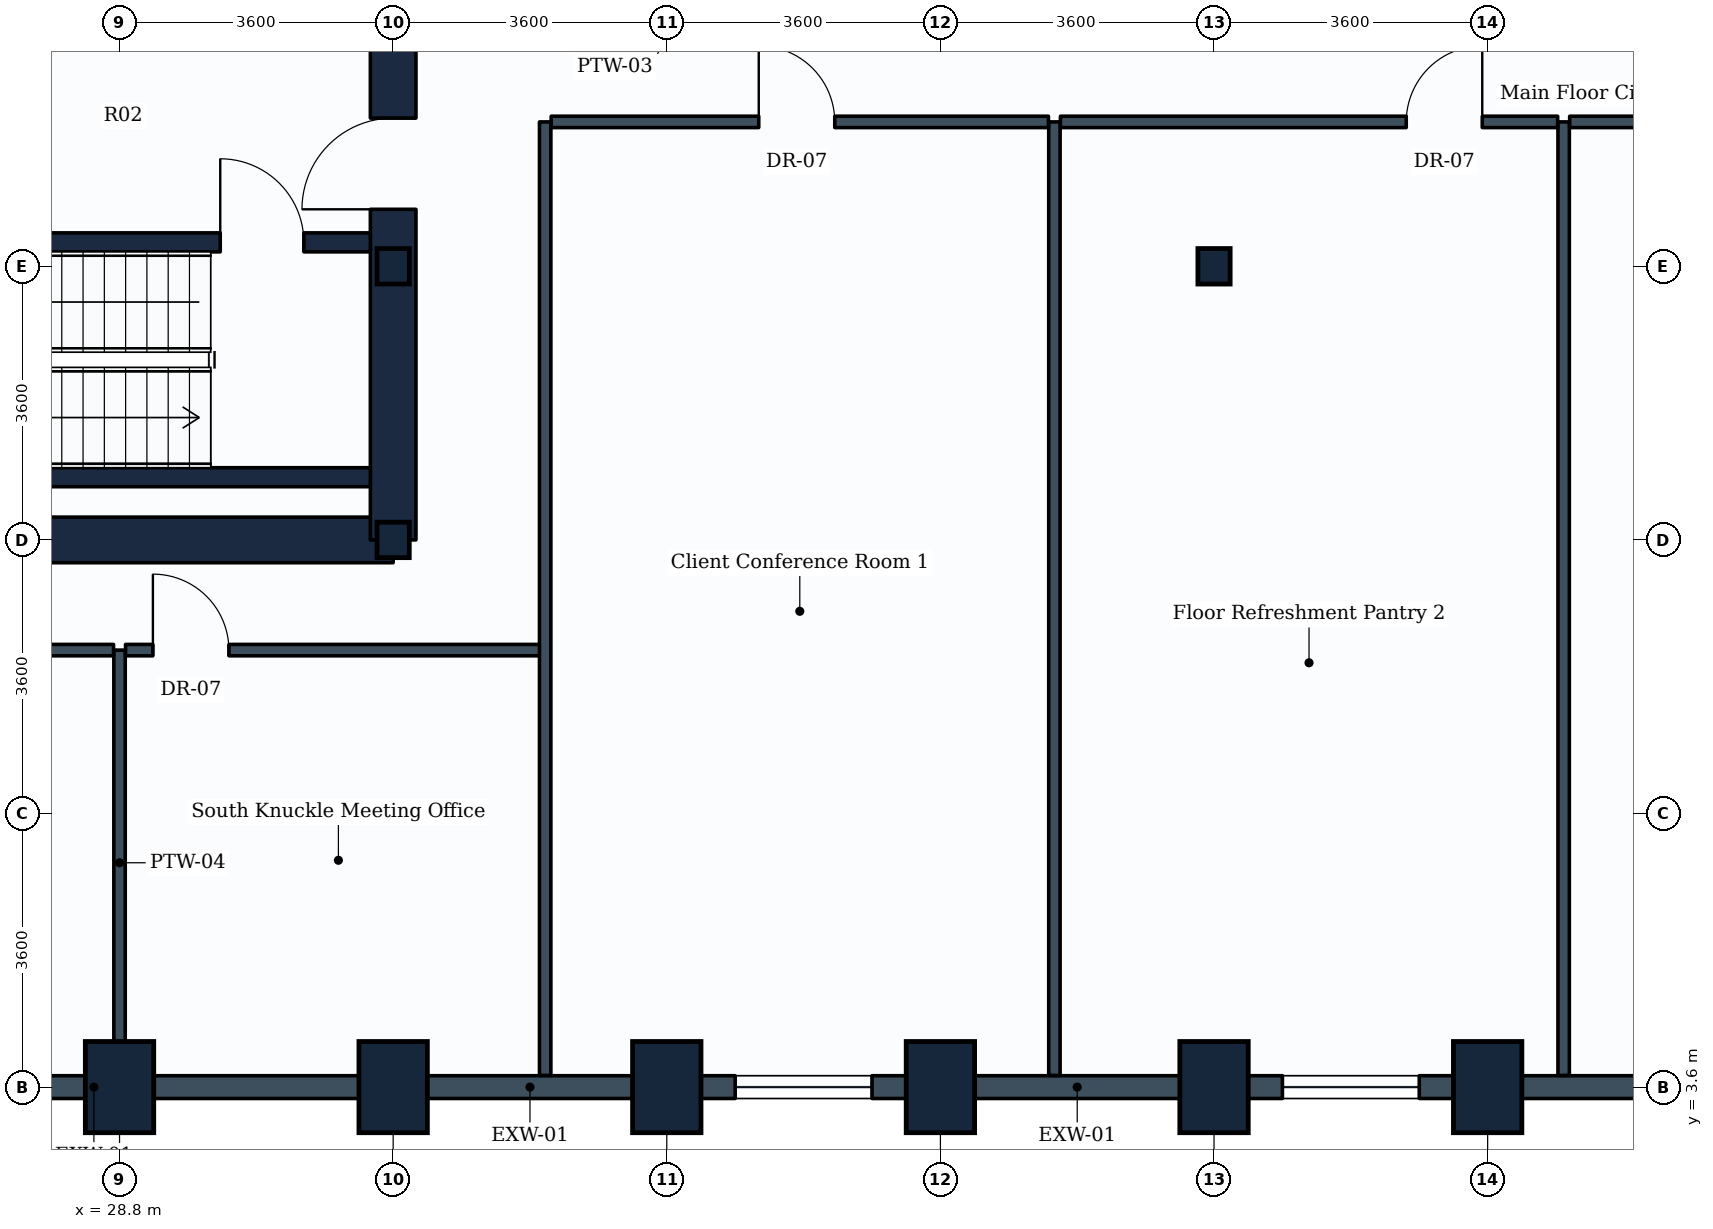
"""IFC4 building model, lengths in metres.
Left out: names, types, materials, properties, quantities, classifications, styles, units other than length and angle.
Written with IfcOpenShell. Run it as: python <this file> out.ifc"""

import sys

from ifc_helpers import new_model, si_unit, direction, frame, frame_2d, origin, origin_2d, place, context, subcontext, project, spatial, rectangle, i_section, extrude, element, fill, save


model = new_model("IFC4")
c1 = context("Model", 3, precision=1e-05, world=origin(), true_north=direction((0.0, 1.0)))
c2 = subcontext(c1, "Body", "Model", "MODEL_VIEW")
j1 = project(units=[si_unit("LENGTHUNIT", "METRE"), si_unit("PLANEANGLEUNIT", "RADIAN")], contexts=[c1])
p1 = place(None, origin())
s1 = spatial("IfcSite", under=j1, at=p1, CompositionType="ELEMENT")
p2 = place(p1, origin())
s2 = spatial("IfcBuilding", under=s1, at=p2, CompositionType="ELEMENT")
p3 = place(p2, frame((0.0, 0.0, 39.6)))
s3 = spatial("IfcBuildingStorey", under=s2, at=p3, CompositionType="ELEMENT", Elevation=39.6)
for number, where, z_axis, x_axis in (
    (1, (28.8, 3.6, 0.0), (0.0, 0.0, 1.0), (1.0, 0.0, 0.0)),
    (2, (32.4, 3.6, 0.0), (0.0, 0.0, 1.0), (1.0, 0.0, 0.0)),
):
    element("IfcColumn", number, at=place(p3, frame(where, z_axis=z_axis, x_axis=x_axis)), inside=s3, PredefinedType="COLUMN", context=c2, shape_type="SweptSolid", body=[
        extrude(rectangle(XDim=0.9, YDim=1.2, at=origin_2d()), origin(), (0.0, 0.0, 1.0), 3.9),
    ])
for number, where, z_axis, x_axis in (
    (3, (32.4, 10.8, 0.0), (0.0, 0.0, 1.0), (1.0, 0.0, 0.0)),
    (4, (32.4, 14.4, 0.0), (0.0, 0.0, 1.0), (1.0, 0.0, 0.0)),
):
    element("IfcColumn", number, at=place(p3, frame(where, z_axis=z_axis, x_axis=x_axis)), inside=s3, PredefinedType="COLUMN", context=c2, shape_type="SweptSolid", body=[
        extrude(i_section(OverallWidth=0.424, OverallDepth=0.467, WebThickness=0.033, FlangeThickness=0.053, FilletRadius=0.015, at=origin_2d()), origin(), (0.0, 0.0, 1.0), 3.9),
    ])
for number, where, z_axis, x_axis in (
    (5, (36.0, 3.6, 0.0), (0.0, 0.0, 1.0), (1.0, 0.0, 0.0)),
    (6, (39.6, 3.6, 0.0), (0.0, 0.0, 1.0), (1.0, 0.0, 0.0)),
    (7, (43.2, 3.6, 0.0), (0.0, 0.0, 1.0), (1.0, 0.0, 0.0)),
):
    element("IfcColumn", number, at=place(p3, frame(where, z_axis=z_axis, x_axis=x_axis)), inside=s3, PredefinedType="COLUMN", context=c2, shape_type="SweptSolid", body=[
        extrude(rectangle(XDim=0.9, YDim=1.2, at=origin_2d()), origin(), (0.0, 0.0, 1.0), 3.9),
    ])
p4 = place(p3, frame((43.2, 14.4, 0.0), z_axis=(0.0, 0.0, 1.0), x_axis=(1.0, 0.0, 0.0)))
e8 = element("IfcColumn", 8, at=p4, inside=s3, PredefinedType="COLUMN", context=c2, shape_type="SweptSolid", body=[
    extrude(i_section(OverallWidth=0.424, OverallDepth=0.467, WebThickness=0.033, FlangeThickness=0.053, FilletRadius=0.015, at=origin_2d()), origin(), (0.0, 0.0, 1.0), 3.9),
])
p5 = place(p3, frame((46.8, 3.6, 0.0), z_axis=(0.0, 0.0, 1.0), x_axis=(1.0, 0.0, 0.0)))
e9 = element("IfcColumn", 9, at=p5, inside=s3, PredefinedType="COLUMN", context=c2, shape_type="SweptSolid", body=[
    extrude(rectangle(XDim=0.9, YDim=1.2, at=origin_2d()), origin(), (0.0, 0.0, 1.0), 3.9),
])
p6 = place(p3, frame((28.8, 3.6, 0.0), z_axis=(0.0, 0.0, 1.0), x_axis=(-1.0, 0.0, 0.0)))
e10 = element("IfcWall", 10, at=p6, inside=s3, PredefinedType="STANDARD", context=c2, shape_type="SweptSolid", body=[
    extrude(rectangle(XDim=3.6, YDim=0.3, at=frame_2d((1.8, 0.0))), origin(), (0.0, 0.0, 1.0), 2.93),
])
p7 = place(p6, frame((0.925, 0.0, 0.85)))
e11 = element("IfcOpeningElement", 11, at=p7, cuts=e10, PredefinedType="OPENING", context=c2, shape_type="SweptSolid", body=[
    extrude(rectangle(XDim=1.8, YDim=1.35, at=frame_2d((0.9, 0.675))), frame((0.0, 0.16, 0.0), z_axis=(0.0, -1.0, 0.0), x_axis=(1.0, 0.0, 0.0)), (0.0, 0.0, 1.0), 0.32),
])
p8 = place(p3, frame((32.4, 3.6, 0.0), z_axis=(0.0, 0.0, 1.0), x_axis=(-1.0, 0.0, 0.0)))
e12 = element("IfcWall", 12, at=p8, inside=s3, PredefinedType="STANDARD", context=c2, shape_type="SweptSolid", body=[
    extrude(rectangle(XDim=3.6, YDim=0.3, at=frame_2d((1.8, 0.0))), origin(), (0.0, 0.0, 1.0), 2.93),
])
p9 = place(p3, frame((36.0, 3.6, 0.0), z_axis=(0.0, 0.0, 1.0), x_axis=(-1.0, 0.0, 0.0)))
e13 = element("IfcWall", 13, at=p9, inside=s3, PredefinedType="STANDARD", context=c2, shape_type="SweptSolid", body=[
    extrude(rectangle(XDim=3.6, YDim=0.3, at=frame_2d((1.8, 0.0))), origin(), (0.0, 0.0, 1.0), 2.93),
])
p10 = place(p3, frame((39.6, 3.6, 0.0), z_axis=(0.0, 0.0, 1.0), x_axis=(-1.0, 0.0, 0.0)))
e14 = element("IfcWall", 14, at=p10, inside=s3, PredefinedType="STANDARD", context=c2, shape_type="SweptSolid", body=[
    extrude(rectangle(XDim=3.6, YDim=0.3, at=frame_2d((1.8, 0.0))), origin(), (0.0, 0.0, 1.0), 2.93),
])
p11 = place(p10, frame((0.9, 0.0, 0.85)))
e15 = element("IfcOpeningElement", 15, at=p11, cuts=e14, PredefinedType="OPENING", context=c2, shape_type="SweptSolid", body=[
    extrude(rectangle(XDim=1.8, YDim=1.35, at=frame_2d((0.9, 0.675))), frame((0.0, 0.16, 0.0), z_axis=(0.0, -1.0, 0.0), x_axis=(1.0, 0.0, 0.0)), (0.0, 0.0, 1.0), 0.32),
])
p12 = place(p3, frame((43.2, 3.6, 0.0), z_axis=(0.0, 0.0, 1.0), x_axis=(-1.0, 0.0, 0.0)))
e16 = element("IfcWall", 16, at=p12, inside=s3, PredefinedType="STANDARD", context=c2, shape_type="SweptSolid", body=[
    extrude(rectangle(XDim=3.6, YDim=0.3, at=frame_2d((1.8, 0.0))), origin(), (0.0, 0.0, 1.0), 2.93),
])
p13 = place(p3, frame((46.8, 3.6, 0.0), z_axis=(0.0, 0.0, 1.0), x_axis=(-1.0, 0.0, 0.0)))
e17 = element("IfcWall", 17, at=p13, inside=s3, PredefinedType="STANDARD", context=c2, shape_type="SweptSolid", body=[
    extrude(rectangle(XDim=3.6, YDim=0.3, at=frame_2d((1.8, 0.0))), origin(), (0.0, 0.0, 1.0), 2.93),
])
p14 = place(p13, frame((0.9, 0.0, 0.85)))
e18 = element("IfcOpeningElement", 18, at=p14, cuts=e17, PredefinedType="OPENING", context=c2, shape_type="SweptSolid", body=[
    extrude(rectangle(XDim=1.8, YDim=1.35, at=frame_2d((0.9, 0.675))), frame((0.0, 0.16, 0.0), z_axis=(0.0, -1.0, 0.0), x_axis=(1.0, 0.0, 0.0)), (0.0, 0.0, 1.0), 0.32),
])
p15 = place(p3, frame((50.4, 3.6, 0.0), z_axis=(0.0, 0.0, 1.0), x_axis=(-1.0, 0.0, 0.0)))
e19 = element("IfcWall", 19, at=p15, inside=s3, PredefinedType="STANDARD", context=c2, shape_type="SweptSolid", body=[
    extrude(rectangle(XDim=3.6, YDim=0.3, at=frame_2d((1.8, 0.0))), origin(), (0.0, 0.0, 1.0), 2.93),
])
p16 = place(p3, frame((14.4, 10.8, 0.0), z_axis=(0.0, 0.0, 1.0), x_axis=(1.0, 0.0, 0.0)))
e20 = element("IfcWall", 20, at=p16, inside=s3, PredefinedType="SHEAR", context=c2, shape_type="SweptSolid", body=[
    extrude(rectangle(XDim=18.0, YDim=0.6, at=frame_2d((9.0, 0.0))), origin(), (0.0, 0.0, 1.0), 3.65),
])
p17 = place(p3, frame((32.4, 10.8, 0.0), z_axis=(0.0, 0.0, 1.0), x_axis=(0.0, 1.0, 0.0)))
e21 = element("IfcWall", 21, at=p17, inside=s3, PredefinedType="SHEAR", context=c2, shape_type="SweptSolid", body=[
    extrude(rectangle(XDim=14.4, YDim=0.6, at=frame_2d((7.2, 0.0))), origin(), (0.0, 0.0, 1.0), 3.65),
])
p18 = place(p17, frame((4.35, 0.0, 0.0)))
e22 = element("IfcOpeningElement", 22, at=p18, cuts=e21, PredefinedType="OPENING", context=c2, shape_type="SweptSolid", body=[
    extrude(rectangle(XDim=1.2, YDim=2.1, at=frame_2d((0.6, 1.05))), frame((0.0, 0.31, 0.0), z_axis=(0.0, -1.0, 0.0), x_axis=(1.0, 0.0, 0.0)), (0.0, 0.0, 1.0), 0.62),
])
p19 = place(p17, frame((10.0, 0.0, 0.0)))
e23 = element("IfcOpeningElement", 23, at=p19, cuts=e21, PredefinedType="OPENING", context=c2, shape_type="SweptSolid", body=[
    extrude(rectangle(XDim=1.2, YDim=2.1, at=frame_2d((0.6, 1.05))), frame((0.0, 0.31, 0.0), z_axis=(0.0, -1.0, 0.0), x_axis=(1.0, 0.0, 0.0)), (0.0, 0.0, 1.0), 0.62),
])
p20 = place(p3, frame((23.35, 11.625, 0.0), z_axis=(0.0, 0.0, 1.0), x_axis=(1.0, 0.0, 0.0)))
e24 = element("IfcWall", 24, at=p20, inside=s3, PredefinedType="SHEAR", context=c2, shape_type="SweptSolid", body=[
    extrude(rectangle(XDim=8.75, YDim=0.25, at=frame_2d((4.375, 0.0))), origin(), (0.0, 0.0, 1.0), 3.65),
])
p21 = place(p3, frame((23.35, 14.715, 0.0), z_axis=(0.0, 0.0, 1.0), x_axis=(1.0, 0.0, 0.0)))
e25 = element("IfcWall", 25, at=p21, inside=s3, PredefinedType="SHEAR", context=c2, shape_type="SweptSolid", body=[
    extrude(rectangle(XDim=8.75, YDim=0.25, at=frame_2d((4.375, 0.0))), origin(), (0.0, 0.0, 1.0), 3.65),
])
p22 = place(p21, frame((6.775, 0.0, 0.0)))
e26 = element("IfcOpeningElement", 26, at=p22, cuts=e25, PredefinedType="OPENING", context=c2, shape_type="SweptSolid", body=[
    extrude(rectangle(XDim=1.1, YDim=2.1, at=frame_2d((0.55, 1.05))), frame((0.0, 0.135, 0.0), z_axis=(0.0, -1.0, 0.0), x_axis=(1.0, 0.0, 0.0)), (0.0, 0.0, 1.0), 0.27),
])
p23 = place(p3, frame((28.8, 9.35, 0.0), z_axis=(0.0, 0.0, 1.0), x_axis=(0.0, -1.0, 0.0)))
e27 = element("IfcWall", 27, at=p23, inside=s3, PredefinedType="PARTITIONING", context=c2, shape_type="SweptSolid", body=[
    extrude(rectangle(XDim=5.596, YDim=0.15, at=frame_2d((2.798, 0.0))), origin(), (0.0, 0.0, 1.0), 3.635),
])
p24 = place(p3, frame((20.479, 9.35, 0.0), z_axis=(0.0, 0.0, 1.0), x_axis=(1.0, 0.0, 0.0)))
e28 = element("IfcWall", 28, at=p24, inside=s3, PredefinedType="PARTITIONING", context=c2, shape_type="SweptSolid", body=[
    extrude(rectangle(XDim=8.242, YDim=0.15, at=frame_2d((4.121, 0.0))), origin(), (0.0, 0.0, 1.0), 3.08),
])
p25 = place(p24, frame((3.939, 0.0, 0.0)))
e29 = element("IfcOpeningElement", 29, at=p25, cuts=e28, PredefinedType="OPENING", context=c2, shape_type="SweptSolid", body=[
    extrude(rectangle(XDim=1.0, YDim=2.1, at=frame_2d((0.5, 1.05))), frame((0.0, 0.085, 0.0), z_axis=(0.0, -1.0, 0.0), x_axis=(1.0, 0.0, 0.0)), (0.0, 0.0, 1.0), 0.17),
])
p26 = place(p3, frame((28.879, 9.35, 0.0), z_axis=(0.0, 0.0, 1.0), x_axis=(1.0, 0.0, 0.0)))
e30 = element("IfcWall", 30, at=p26, inside=s3, PredefinedType="PARTITIONING", context=c2, shape_type="SweptSolid", body=[
    extrude(rectangle(XDim=5.521, YDim=0.15, at=frame_2d((2.76, 0.0))), origin(), (0.0, 0.0, 1.0), 3.635),
])
p27 = place(p26, frame((0.36, 0.0, 0.0)))
e31 = element("IfcOpeningElement", 31, at=p27, cuts=e30, PredefinedType="OPENING", context=c2, shape_type="SweptSolid", body=[
    extrude(rectangle(XDim=1.0, YDim=2.1, at=frame_2d((0.5, 1.05))), frame((0.0, 0.085, 0.0), z_axis=(0.0, -1.0, 0.0), x_axis=(1.0, 0.0, 0.0)), (0.0, 0.0, 1.0), 0.17),
])
for number, where, z_axis, x_axis in (
    (32, (34.4, 3.754, 0.0), (0.0, 0.0, 1.0), (0.0, 1.0, 0.0)),
    (33, (41.1, 3.754, 0.0), (0.0, 0.0, 1.0), (0.0, 1.0, 0.0)),
):
    element("IfcWall", number, at=place(p3, frame(where, z_axis=z_axis, x_axis=x_axis)), inside=s3, PredefinedType="PARTITIONING", context=c2, shape_type="SweptSolid", body=[
        extrude(rectangle(XDim=12.546, YDim=0.15, at=frame_2d((6.273, 0.0))), origin(), (0.0, 0.0, 1.0), 2.93),
    ])
p28 = place(p3, frame((34.479, 16.3, 0.0), z_axis=(0.0, 0.0, 1.0), x_axis=(1.0, 0.0, 0.0)))
e34 = element("IfcWall", 34, at=p28, inside=s3, PredefinedType="PARTITIONING", context=c2, shape_type="SweptSolid", body=[
    extrude(rectangle(XDim=6.542, YDim=0.15, at=frame_2d((3.271, 0.0))), origin(), (0.0, 0.0, 1.0), 3.04),
])
p29 = place(p28, frame((2.731, 0.0, 0.0)))
e35 = element("IfcOpeningElement", 35, at=p29, cuts=e34, PredefinedType="OPENING", context=c2, shape_type="SweptSolid", body=[
    extrude(rectangle(XDim=1.0, YDim=2.1, at=frame_2d((0.5, 1.05))), frame((0.0, 0.085, 0.0), z_axis=(0.0, -1.0, 0.0), x_axis=(1.0, 0.0, 0.0)), (0.0, 0.0, 1.0), 0.17),
])
p30 = place(p3, frame((47.8, 3.754, 0.0), z_axis=(0.0, 0.0, 1.0), x_axis=(0.0, 1.0, 0.0)))
e36 = element("IfcWall", 36, at=p30, inside=s3, PredefinedType="PARTITIONING", context=c2, shape_type="SweptSolid", body=[
    extrude(rectangle(XDim=12.546, YDim=0.15, at=frame_2d((6.273, 0.0))), origin(), (0.0, 0.0, 1.0), 2.93),
])
p31 = place(p3, frame((41.179, 16.3, 0.0), z_axis=(0.0, 0.0, 1.0), x_axis=(1.0, 0.0, 0.0)))
e37 = element("IfcWall", 37, at=p31, inside=s3, PredefinedType="PARTITIONING", context=c2, shape_type="SweptSolid", body=[
    extrude(rectangle(XDim=6.542, YDim=0.15, at=frame_2d((3.271, 0.0))), origin(), (0.0, 0.0, 1.0), 3.04),
])
p32 = place(p31, frame((4.55, 0.0, 0.0)))
e38 = element("IfcOpeningElement", 38, at=p32, cuts=e37, PredefinedType="OPENING", context=c2, shape_type="SweptSolid", body=[
    extrude(rectangle(XDim=1.0, YDim=2.1, at=frame_2d((0.5, 1.05))), frame((0.0, 0.085, 0.0), z_axis=(0.0, -1.0, 0.0), x_axis=(1.0, 0.0, 0.0)), (0.0, 0.0, 1.0), 0.17),
])
p33 = place(p3, frame((47.879, 16.3, 0.0), z_axis=(0.0, 0.0, 1.0), x_axis=(1.0, 0.0, 0.0)))
e39 = element("IfcWall", 39, at=p33, inside=s3, PredefinedType="PARTITIONING", context=c2, shape_type="SweptSolid", body=[
    extrude(rectangle(XDim=6.542, YDim=0.15, at=frame_2d((3.271, 0.0))), origin(), (0.0, 0.0, 1.0), 3.04),
])
p34 = place(p33, frame((5.103, 0.0, 0.0)))
e40 = element("IfcOpeningElement", 40, at=p34, cuts=e39, PredefinedType="OPENING", context=c2, shape_type="SweptSolid", body=[
    extrude(rectangle(XDim=1.0, YDim=2.1, at=frame_2d((0.5, 1.05))), frame((0.0, 0.085, 0.0), z_axis=(0.0, -1.0, 0.0), x_axis=(1.0, 0.0, 0.0)), (0.0, 0.0, 1.0), 0.17),
])
p35 = place(p11, origin())
e41 = element("IfcWindow", 41, at=p35, inside=s3, PartitioningType="SINGLE_PANEL", PredefinedType="WINDOW", context=c2, shape_type="SweptSolid", body=[
    extrude(rectangle(XDim=1.8, YDim=1.35, at=frame_2d((0.9, 0.675))), frame((0.0, 0.03, 0.0), z_axis=(0.0, -1.0, 0.0), x_axis=(1.0, 0.0, 0.0)), (0.0, 0.0, 1.0), 0.06),
])
fill(e15, e41)
p36 = place(p14, origin())
e42 = element("IfcWindow", 42, at=p36, inside=s3, PartitioningType="SINGLE_PANEL", PredefinedType="WINDOW", context=c2, shape_type="SweptSolid", body=[
    extrude(rectangle(XDim=1.8, YDim=1.35, at=frame_2d((0.9, 0.675))), frame((0.0, 0.03, 0.0), z_axis=(0.0, -1.0, 0.0), x_axis=(1.0, 0.0, 0.0)), (0.0, 0.0, 1.0), 0.06),
])
fill(e18, e42)
p37 = place(p22, origin())
e43 = element("IfcDoor", 43, at=p37, inside=s3, OperationType="SINGLE_SWING_LEFT", PredefinedType="DOOR", context=c2, shape_type="SweptSolid", body=[
    extrude(rectangle(XDim=1.1, YDim=2.1, at=frame_2d((0.55, 1.05))), frame((0.0, 0.025, 0.0), z_axis=(0.0, -1.0, 0.0), x_axis=(1.0, 0.0, 0.0)), (0.0, 0.0, 1.0), 0.05),
])
fill(e26, e43)
p38 = place(p18, origin())
e44 = element("IfcDoor", 44, at=p38, inside=s3, OperationType="SINGLE_SWING_LEFT", PredefinedType="DOOR", context=c2, shape_type="SweptSolid", body=[
    extrude(rectangle(XDim=1.2, YDim=2.1, at=frame_2d((0.6, 1.05))), frame((0.0, 0.025, 0.0), z_axis=(0.0, -1.0, 0.0), x_axis=(1.0, 0.0, 0.0)), (0.0, 0.0, 1.0), 0.05),
])
fill(e22, e44)
p39 = place(p27, origin())
e45 = element("IfcDoor", 45, at=p39, inside=s3, OperationType="SINGLE_SWING_LEFT", PredefinedType="DOOR", context=c2, shape_type="SweptSolid", body=[
    extrude(rectangle(XDim=1.0, YDim=2.1, at=frame_2d((0.5, 1.05))), frame((0.0, 0.025, 0.0), z_axis=(0.0, -1.0, 0.0), x_axis=(1.0, 0.0, 0.0)), (0.0, 0.0, 1.0), 0.05),
])
fill(e31, e45)
p40 = place(p29, origin())
e46 = element("IfcDoor", 46, at=p40, inside=s3, OperationType="SINGLE_SWING_LEFT", PredefinedType="DOOR", context=c2, shape_type="SweptSolid", body=[
    extrude(rectangle(XDim=1.0, YDim=2.1, at=frame_2d((0.5, 1.05))), frame((0.0, 0.025, 0.0), z_axis=(0.0, -1.0, 0.0), x_axis=(1.0, 0.0, 0.0)), (0.0, 0.0, 1.0), 0.05),
])
fill(e35, e46)
p41 = place(p32, origin())
e47 = element("IfcDoor", 47, at=p41, inside=s3, OperationType="SINGLE_SWING_RIGHT", PredefinedType="DOOR", context=c2, shape_type="SweptSolid", body=[
    extrude(rectangle(XDim=1.0, YDim=2.1, at=frame_2d((0.5, 1.05))), frame((0.0, 0.025, 0.0), z_axis=(0.0, -1.0, 0.0), x_axis=(1.0, 0.0, 0.0)), (0.0, 0.0, 1.0), 0.05),
])
fill(e38, e47)
save(model, sys.argv[1])
